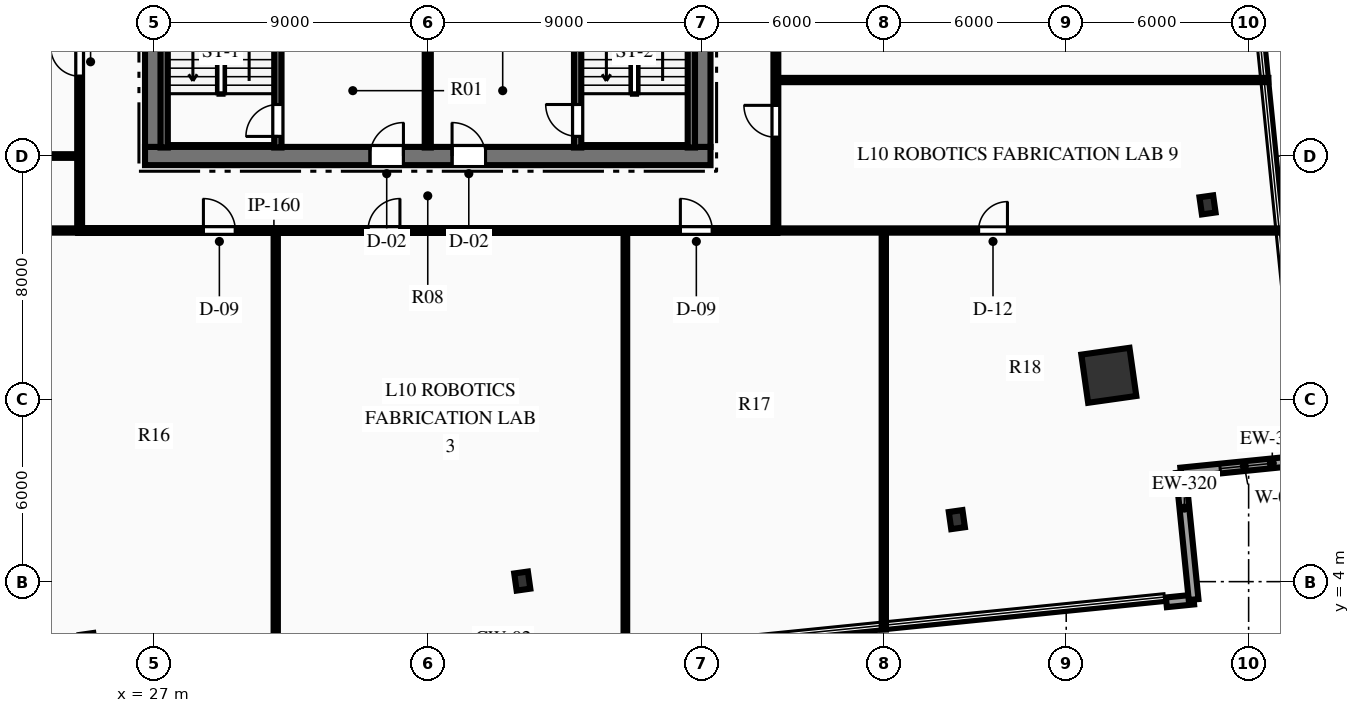
"""IFC4 building model, lengths in metres.
Left out: names, types, materials, properties, quantities, classifications, styles, units other than length and angle.
Written with IfcOpenShell. Run it as: python <this file> out.ifc"""

import sys

from ifc_helpers import new_model, si_unit, direction, frame, frame_2d, origin, origin_2d, place, context, subcontext, project, spatial, rectangle, hollow_rectangle, i_section, extrude, element, fill, save


model = new_model("IFC4")
c1 = context("Model", 3, precision=1e-05, world=origin(), true_north=direction((0.0, 1.0)))
c2 = subcontext(c1, "Body", "Model", "MODEL_VIEW")
j1 = project(units=[si_unit("LENGTHUNIT", "METRE"), si_unit("PLANEANGLEUNIT", "RADIAN")], contexts=[c1])
p1 = place(None, origin())
s1 = spatial("IfcSite", under=j1, at=p1, CompositionType="ELEMENT")
p2 = place(p1, origin())
s2 = spatial("IfcBuilding", under=s1, at=p2, CompositionType="ELEMENT")
p3 = place(p2, frame((0.0, 0.0, 47.7)))
s3 = spatial("IfcBuildingStorey", under=s2, at=p3, CompositionType="ELEMENT", Elevation=47.7)
p4 = place(p3, frame((26.7, 18.0, 0.0), z_axis=(0.0, 0.0, 1.0), x_axis=(1.0, 0.0, 0.0)))
e1 = element("IfcWall", 1, at=p4, inside=s3, PredefinedType="SHEAR", context=c2, shape_type="SweptSolid", body=[
    extrude(rectangle(XDim=18.6, YDim=0.6, at=frame_2d((9.3, 0.0))), origin(), (0.0, 0.0, 1.0), 3.75),
])
p5 = place(p4, frame((7.4, 0.0, 0.0)))
e2 = element("IfcOpeningElement", 2, at=p5, cuts=e1, PredefinedType="OPENING", context=c2, shape_type="SweptSolid", body=[
    extrude(rectangle(XDim=1.1, YDim=2.15, at=frame_2d((0.55, 1.075))), frame((0.0, 0.31, 0.0), z_axis=(0.0, -1.0, 0.0), x_axis=(1.0, 0.0, 0.0)), (0.0, 0.0, 1.0), 0.62),
])
p6 = place(p4, frame((10.1, 0.0, 0.0)))
e3 = element("IfcOpeningElement", 3, at=p6, cuts=e1, PredefinedType="OPENING", context=c2, shape_type="SweptSolid", body=[
    extrude(rectangle(XDim=1.1, YDim=2.15, at=frame_2d((0.55, 1.075))), frame((0.0, 0.31, 0.0), z_axis=(0.0, -1.0, 0.0), x_axis=(1.0, 0.0, 0.0)), (0.0, 0.0, 1.0), 0.62),
])
p7 = place(p3, frame((27.0, 18.3, 0.0), z_axis=(0.0, 0.0, 1.0), x_axis=(0.0, 1.0, 0.0)))
e4 = element("IfcWall", 4, at=p7, inside=s3, PredefinedType="SHEAR", context=c2, shape_type="SweptSolid", body=[
    extrude(rectangle(XDim=15.4, YDim=0.6, at=frame_2d((7.7, 0.0))), origin(), (0.0, 0.0, 1.0), 3.75),
])
p8 = place(p7, frame((9.94, 0.0, 0.0)))
e5 = element("IfcOpeningElement", 5, at=p8, cuts=e4, PredefinedType="OPENING", context=c2, shape_type="SweptSolid", body=[
    extrude(rectangle(XDim=1.4, YDim=2.2, at=frame_2d((0.7, 1.1))), frame((0.0, 0.31, 0.0), z_axis=(0.0, -1.0, 0.0), x_axis=(1.0, 0.0, 0.0)), (0.0, 0.0, 1.0), 0.62),
])
p9 = place(p3, frame((45.0, 18.3, 0.0), z_axis=(0.0, 0.0, 1.0), x_axis=(0.0, 1.0, 0.0)))
e6 = element("IfcWall", 6, at=p9, inside=s3, PredefinedType="SHEAR", context=c2, shape_type="SweptSolid", body=[
    extrude(rectangle(XDim=15.4, YDim=0.6, at=frame_2d((7.7, 0.0))), origin(), (0.0, 0.0, 1.0), 3.75),
])
p10 = place(p9, frame((9.94, 0.0, 0.0)))
e7 = element("IfcOpeningElement", 7, at=p10, cuts=e6, PredefinedType="OPENING", context=c2, shape_type="SweptSolid", body=[
    extrude(rectangle(XDim=1.4, YDim=2.2, at=frame_2d((0.7, 1.1))), frame((0.0, 0.31, 0.0), z_axis=(0.0, -1.0, 0.0), x_axis=(1.0, 0.0, 0.0)), (0.0, 0.0, 1.0), 0.62),
])
p11 = place(p3, frame((31.07, 18.28, 0.0), z_axis=(0.0, 0.0, 1.0), x_axis=(0.0, 1.0, 0.0)))
e8 = element("IfcWall", 8, at=p11, inside=s3, PredefinedType="SHEAR", context=c2, shape_type="SweptSolid", body=[
    extrude(rectangle(XDim=8.26, YDim=0.24, at=frame_2d((4.13, 0.0))), origin(), (0.0, 0.0, 1.0), 3.75),
])
p12 = place(p11, frame((0.365, 0.0, 0.0)))
e9 = element("IfcOpeningElement", 9, at=p12, cuts=e8, PredefinedType="OPENING", context=c2, shape_type="SweptSolid", body=[
    extrude(rectangle(XDim=1.05, YDim=2.15, at=frame_2d((0.525, 1.075))), frame((0.0, 0.13, 0.0), z_axis=(0.0, -1.0, 0.0), x_axis=(1.0, 0.0, 0.0)), (0.0, 0.0, 1.0), 0.26),
])
p13 = place(p3, frame((27.33, 18.28, 0.0), z_axis=(0.0, 0.0, 1.0), x_axis=(0.0, 1.0, 0.0)))
e10 = element("IfcWall", 10, at=p13, inside=s3, PredefinedType="SHEAR", context=c2, shape_type="SweptSolid", body=[
    extrude(rectangle(XDim=8.26, YDim=0.24, at=frame_2d((4.13, 0.0))), origin(), (0.0, 0.0, 1.0), 3.75),
])
p14 = place(p3, frame((40.93, 18.28, 0.0), z_axis=(0.0, 0.0, 1.0), x_axis=(0.0, 1.0, 0.0)))
e11 = element("IfcWall", 11, at=p14, inside=s3, PredefinedType="SHEAR", context=c2, shape_type="SweptSolid", body=[
    extrude(rectangle(XDim=8.26, YDim=0.24, at=frame_2d((4.13, 0.0))), origin(), (0.0, 0.0, 1.0), 3.75),
])
p15 = place(p14, frame((0.365, 0.0, 0.0)))
e12 = element("IfcOpeningElement", 12, at=p15, cuts=e11, PredefinedType="OPENING", context=c2, shape_type="SweptSolid", body=[
    extrude(rectangle(XDim=1.05, YDim=2.15, at=frame_2d((0.525, 1.075))), frame((0.0, 0.13, 0.0), z_axis=(0.0, -1.0, 0.0), x_axis=(1.0, 0.0, 0.0)), (0.0, 0.0, 1.0), 0.26),
])
p16 = place(p3, frame((44.67, 18.28, 0.0), z_axis=(0.0, 0.0, 1.0), x_axis=(0.0, 1.0, 0.0)))
e13 = element("IfcWall", 13, at=p16, inside=s3, PredefinedType="SHEAR", context=c2, shape_type="SweptSolid", body=[
    extrude(rectangle(XDim=8.26, YDim=0.24, at=frame_2d((4.13, 0.0))), origin(), (0.0, 0.0, 1.0), 3.75),
])
p17 = place(p3, frame((58.401, 10.787, 0.0), z_axis=(0.0, 0.0, 1.0), x_axis=(0.990146240249, 0.140037219771, 0.0)))
e14 = element("IfcColumn", 14, at=p17, inside=s3, PredefinedType="COLUMN", context=c2, shape_type="SweptSolid", body=[
    extrude(hollow_rectangle(XDim=1.6, YDim=1.6, WallThickness=0.08, at=origin_2d()), origin(), (0.0, 0.0, 1.0), 3.75),
])
for number, where, z_axis, x_axis in (
    (15, (24.815, 1.997, 0.0), (0.0, 0.0, 1.0), (0.99, 0.14, 0.0)),
    (16, (39.109, 4.019, 0.0), (0.0, 0.0, 1.0), (0.99, 0.14, 0.0)),
    (17, (53.403, 6.04, 0.0), (0.0, 0.0, 1.0), (0.99, 0.14, 0.0)),
    (18, (61.648, 16.393, 0.0), (0.0, 0.0, 1.0), (0.99, 0.14, 0.0)),
):
    element("IfcColumn", number, at=place(p3, frame(where, z_axis=z_axis, x_axis=x_axis)), inside=s3, PredefinedType="COLUMN", context=c2, shape_type="SweptSolid", body=[
        extrude(i_section(OverallWidth=0.454, OverallDepth=0.569, WebThickness=0.078, FlangeThickness=0.125, at=origin_2d()), origin(), (0.0, 0.0, 1.0), 3.75),
    ])
p18 = place(p3, frame((61.19, 3.41, 0.0), z_axis=(0.0, 0.0, 1.0), x_axis=(-0.994950877973, -0.100363092925, 0.0)))
e19 = element("IfcWall", 19, at=p18, inside=s3, PredefinedType="STANDARD", context=c2, shape_type="SweptSolid", body=[
    extrude(rectangle(XDim=0.9, YDim=0.32, at=frame_2d((0.45, 0.0))), origin(), (0.0, 0.0, 1.0), 3.44),
])
p19 = place(p3, frame((60.769, 7.589, 0.0), z_axis=(0.0, 0.0, 1.0), x_axis=(0.100159830235, -0.994971360596, 0.0)))
e20 = element("IfcWall", 20, at=p19, inside=s3, PredefinedType="STANDARD", context=c2, shape_type="SweptSolid", body=[
    extrude(rectangle(XDim=4.2, YDim=0.32, at=frame_2d((2.1, 0.0))), origin(), (0.0, 0.0, 1.0), 3.44),
])
p20 = place(p3, frame((64.948, 8.01, 0.0), z_axis=(0.0, 0.0, 1.0), x_axis=(-0.994965565847, -0.10021737763, 0.0)))
e21 = element("IfcWall", 21, at=p20, inside=s3, PredefinedType="STANDARD", context=c2, shape_type="SweptSolid", body=[
    extrude(rectangle(XDim=4.2, YDim=0.32, at=frame_2d((2.1, 0.0))), origin(), (0.0, 0.0, 1.0), 3.44),
])
p21 = place(p20, frame((1.3, 0.0, 0.85)))
e22 = element("IfcOpeningElement", 22, at=p21, cuts=e21, PredefinedType="OPENING", context=c2, shape_type="SweptSolid", body=[
    extrude(rectangle(XDim=1.6, YDim=2.1, at=frame_2d((0.8, 1.05))), frame((0.0, 0.17, 0.0), z_axis=(0.0, -1.0, 0.0), x_axis=(1.0, 0.0, 0.0)), (0.0, 0.0, 1.0), 0.34),
])
p22 = place(p3, frame((36.0, 18.28, 0.0), z_axis=(0.0, 0.0, 1.0), x_axis=(0.0, 1.0, 0.0)))
e23 = element("IfcWall", 23, at=p22, inside=s3, PredefinedType="PARTITIONING", context=c2, shape_type="SweptSolid", body=[
    extrude(rectangle(XDim=3.77, YDim=0.2, at=frame_2d((1.885, 0.0))), origin(), (0.0, 0.0, 1.0), 3.44),
])
p23 = place(p3, frame((24.5, 15.55, 0.0), z_axis=(0.0, 0.0, 1.0), x_axis=(1.0, 0.0, 0.0)))
e24 = element("IfcWall", 24, at=p23, inside=s3, PredefinedType="PARTITIONING", context=c2, shape_type="SweptSolid", body=[
    extrude(rectangle(XDim=23.0, YDim=0.16, at=frame_2d((11.5, 0.0))), origin(), (0.0, 0.0, 1.0), 3.44),
])
p24 = place(p23, frame((4.121, 0.0, 0.0)))
e25 = element("IfcOpeningElement", 25, at=p24, cuts=e24, PredefinedType="OPENING", context=c2, shape_type="SweptSolid", body=[
    extrude(rectangle(XDim=1.05, YDim=2.15, at=frame_2d((0.525, 1.075))), frame((0.0, 0.09, 0.0), z_axis=(0.0, -1.0, 0.0), x_axis=(1.0, 0.0, 0.0)), (0.0, 0.0, 1.0), 0.18),
])
p25 = place(p23, frame((9.535, 0.0, 0.0)))
e26 = element("IfcOpeningElement", 26, at=p25, cuts=e24, PredefinedType="OPENING", context=c2, shape_type="SweptSolid", body=[
    extrude(rectangle(XDim=1.05, YDim=2.15, at=frame_2d((0.525, 1.075))), frame((0.0, 0.09, 0.0), z_axis=(0.0, -1.0, 0.0), x_axis=(1.0, 0.0, 0.0)), (0.0, 0.0, 1.0), 0.18),
])
p26 = place(p23, frame((19.809, 0.0, 0.0)))
e27 = element("IfcOpeningElement", 27, at=p26, cuts=e24, PredefinedType="OPENING", context=c2, shape_type="SweptSolid", body=[
    extrude(rectangle(XDim=1.05, YDim=2.15, at=frame_2d((0.525, 1.075))), frame((0.0, 0.09, 0.0), z_axis=(0.0, -1.0, 0.0), x_axis=(1.0, 0.0, 0.0)), (0.0, 0.0, 1.0), 0.18),
])
p27 = place(p3, frame((24.55, 15.55, 0.0), z_axis=(0.0, 0.0, 1.0), x_axis=(0.0, 1.0, 0.0)))
e28 = element("IfcWall", 28, at=p27, inside=s3, PredefinedType="PARTITIONING", context=c2, shape_type="SweptSolid", body=[
    extrude(rectangle(XDim=20.9, YDim=0.16, at=frame_2d((10.45, 0.0))), origin(), (0.0, 0.0, 1.0), 3.44),
])
p28 = place(p27, frame((5.075, 0.0, 0.0)))
e29 = element("IfcOpeningElement", 29, at=p28, cuts=e28, PredefinedType="OPENING", context=c2, shape_type="SweptSolid", body=[
    extrude(rectangle(XDim=0.95, YDim=2.15, at=frame_2d((0.475, 1.075))), frame((0.0, 0.09, 0.0), z_axis=(0.0, -1.0, 0.0), x_axis=(1.0, 0.0, 0.0)), (0.0, 0.0, 1.0), 0.18),
])
p29 = place(p27, frame((15.563, 0.0, 0.0)))
e30 = element("IfcOpeningElement", 30, at=p29, cuts=e28, PredefinedType="OPENING", context=c2, shape_type="SweptSolid", body=[
    extrude(rectangle(XDim=1.05, YDim=2.15, at=frame_2d((0.525, 1.075))), frame((0.0, 0.09, 0.0), z_axis=(0.0, -1.0, 0.0), x_axis=(1.0, 0.0, 0.0)), (0.0, 0.0, 1.0), 0.18),
])
p30 = place(p3, frame((47.45, 15.55, 0.0), z_axis=(0.0, 0.0, 1.0), x_axis=(0.0, 1.0, 0.0)))
e31 = element("IfcWall", 31, at=p30, inside=s3, PredefinedType="PARTITIONING", context=c2, shape_type="SweptSolid", body=[
    extrude(rectangle(XDim=20.9, YDim=0.16, at=frame_2d((10.45, 0.0))), origin(), (0.0, 0.0, 1.0), 3.44),
])
p31 = place(p30, frame((3.067, 0.0, 0.0)))
e32 = element("IfcOpeningElement", 32, at=p31, cuts=e31, PredefinedType="OPENING", context=c2, shape_type="SweptSolid", body=[
    extrude(rectangle(XDim=1.05, YDim=2.15, at=frame_2d((0.525, 1.075))), frame((0.0, 0.09, 0.0), z_axis=(0.0, -1.0, 0.0), x_axis=(1.0, 0.0, 0.0)), (0.0, 0.0, 1.0), 0.18),
])
p32 = place(p30, frame((6.065, 0.0, 0.0)))
e33 = element("IfcOpeningElement", 33, at=p32, cuts=e31, PredefinedType="OPENING", context=c2, shape_type="SweptSolid", body=[
    extrude(rectangle(XDim=1.05, YDim=2.15, at=frame_2d((0.525, 1.075))), frame((0.0, 0.09, 0.0), z_axis=(0.0, -1.0, 0.0), x_axis=(1.0, 0.0, 0.0)), (0.0, 0.0, 1.0), 0.18),
])
p33 = place(p30, frame((11.661, 0.0, 0.0)))
e34 = element("IfcOpeningElement", 34, at=p33, cuts=e31, PredefinedType="OPENING", context=c2, shape_type="SweptSolid", body=[
    extrude(rectangle(XDim=1.05, YDim=2.15, at=frame_2d((0.525, 1.075))), frame((0.0, 0.09, 0.0), z_axis=(0.0, -1.0, 0.0), x_axis=(1.0, 0.0, 0.0)), (0.0, 0.0, 1.0), 0.18),
])
p34 = place(p30, frame((18.781, 0.0, 0.0)))
e35 = element("IfcOpeningElement", 35, at=p34, cuts=e31, PredefinedType="OPENING", context=c2, shape_type="SweptSolid", body=[
    extrude(rectangle(XDim=1.05, YDim=2.15, at=frame_2d((0.525, 1.075))), frame((0.0, 0.09, 0.0), z_axis=(0.0, -1.0, 0.0), x_axis=(1.0, 0.0, 0.0)), (0.0, 0.0, 1.0), 0.18),
])
p35 = place(p3, frame((9.956, 15.55, 0.0), z_axis=(0.0, 0.0, 1.0), x_axis=(1.0, 0.0, 0.0)))
e36 = element("IfcWall", 36, at=p35, inside=s3, PredefinedType="PARTITIONING", context=c2, shape_type="SweptSolid", body=[
    extrude(rectangle(XDim=14.594, YDim=0.14, at=frame_2d((7.297, 0.0))), origin(), (0.0, 0.0, 1.0), 3.44),
])
p36 = place(p35, frame((9.016, 0.0, 0.0)))
e37 = element("IfcOpeningElement", 37, at=p36, cuts=e36, PredefinedType="OPENING", context=c2, shape_type="SweptSolid", body=[
    extrude(rectangle(XDim=0.95, YDim=2.15, at=frame_2d((0.475, 1.075))), frame((0.0, 0.08, 0.0), z_axis=(0.0, -1.0, 0.0), x_axis=(1.0, 0.0, 0.0)), (0.0, 0.0, 1.0), 0.16),
])
p37 = place(p3, frame((47.45, 15.55, 0.0), z_axis=(0.0, 0.0, 1.0), x_axis=(1.0, 0.0, 0.0)))
e38 = element("IfcWall", 38, at=p37, inside=s3, PredefinedType="PARTITIONING", context=c2, shape_type="SweptSolid", body=[
    extrude(rectangle(XDim=16.699, YDim=0.14, at=frame_2d((8.349, 0.0))), origin(), (0.0, 0.0, 1.0), 3.44),
])
p38 = place(p37, frame((6.667, 0.0, 0.0)))
e39 = element("IfcOpeningElement", 39, at=p38, cuts=e38, PredefinedType="OPENING", context=c2, shape_type="SweptSolid", body=[
    extrude(rectangle(XDim=0.95, YDim=2.15, at=frame_2d((0.475, 1.075))), frame((0.0, 0.08, 0.0), z_axis=(0.0, -1.0, 0.0), x_axis=(1.0, 0.0, 0.0)), (0.0, 0.0, 1.0), 0.16),
])
p39 = place(p3, frame((31.0, 0.41, 0.0), z_axis=(0.0, 0.0, 1.0), x_axis=(0.0, 1.0, 0.0)))
e40 = element("IfcWall", 40, at=p39, inside=s3, PredefinedType="PARTITIONING", context=c2, shape_type="SweptSolid", body=[
    extrude(rectangle(XDim=15.14, YDim=0.14, at=frame_2d((7.57, 0.0))), origin(), (0.0, 0.0, 1.0), 3.44),
])
p40 = place(p3, frame((42.5, 1.568, 0.0), z_axis=(0.0, 0.0, 1.0), x_axis=(0.0, 1.0, 0.0)))
e41 = element("IfcWall", 41, at=p40, inside=s3, PredefinedType="PARTITIONING", context=c2, shape_type="SweptSolid", body=[
    extrude(rectangle(XDim=13.982, YDim=0.12, at=frame_2d((6.991, 0.0))), origin(), (0.0, 0.0, 1.0), 3.44),
])
p41 = place(p3, frame((51.0, 2.424, 0.0), z_axis=(0.0, 0.0, 1.0), x_axis=(0.0, 1.0, 0.0)))
e42 = element("IfcWall", 42, at=p41, inside=s3, PredefinedType="PARTITIONING", context=c2, shape_type="SweptSolid", body=[
    extrude(rectangle(XDim=13.126, YDim=0.14, at=frame_2d((6.563, 0.0))), origin(), (0.0, 0.0, 1.0), 3.44),
])
p42 = place(p3, frame((47.45, 20.5, 0.0), z_axis=(0.0, 0.0, 1.0), x_axis=(1.0, 0.0, 0.0)))
e43 = element("IfcWall", 43, at=p42, inside=s3, PredefinedType="PARTITIONING", context=c2, shape_type="SweptSolid", body=[
    extrude(rectangle(XDim=16.2, YDim=0.14, at=frame_2d((8.1, 0.0))), origin(), (0.0, 0.0, 1.0), 3.44),
])
p43 = place(p3, frame((20.2, 18.0, 0.0), z_axis=(0.0, 0.0, 1.0), x_axis=(1.0, 0.0, 0.0)))
e44 = element("IfcWall", 44, at=p43, inside=s3, PredefinedType="PARTITIONING", context=c2, shape_type="SweptSolid", body=[
    extrude(rectangle(XDim=4.35, YDim=0.12, at=frame_2d((2.175, 0.0))), origin(), (0.0, 0.0, 1.0), 3.44),
])
p44 = place(p21, origin())
e45 = element("IfcWindow", 45, at=p44, inside=s3, PartitioningType="SINGLE_PANEL", PredefinedType="WINDOW", context=c2, shape_type="SweptSolid", body=[
    extrude(rectangle(XDim=1.6, YDim=2.1, at=frame_2d((0.8, 1.05))), frame((0.0, 0.03, 0.0), z_axis=(0.0, -1.0, 0.0), x_axis=(1.0, 0.0, 0.0)), (0.0, 0.0, 1.0), 0.06),
])
fill(e22, e45)
p45 = place(p12, origin())
e46 = element("IfcDoor", 46, at=p45, inside=s3, OperationType="SINGLE_SWING_LEFT", PredefinedType="DOOR", context=c2, shape_type="SweptSolid", body=[
    extrude(rectangle(XDim=1.05, YDim=2.15, at=frame_2d((0.525, 1.075))), frame((0.0, 0.025, 0.0), z_axis=(0.0, -1.0, 0.0), x_axis=(1.0, 0.0, 0.0)), (0.0, 0.0, 1.0), 0.05),
])
fill(e9, e46)
p46 = place(p15, origin())
e47 = element("IfcDoor", 47, at=p46, inside=s3, OperationType="SINGLE_SWING_RIGHT", PredefinedType="DOOR", context=c2, shape_type="SweptSolid", body=[
    extrude(rectangle(XDim=1.05, YDim=2.15, at=frame_2d((0.525, 1.075))), frame((0.0, 0.025, 0.0), z_axis=(0.0, -1.0, 0.0), x_axis=(1.0, 0.0, 0.0)), (0.0, 0.0, 1.0), 0.05),
])
fill(e12, e47)
p47 = place(p5, origin())
e48 = element("IfcDoor", 48, at=p47, inside=s3, OperationType="SINGLE_SWING_RIGHT", PredefinedType="DOOR", context=c2, shape_type="SweptSolid", body=[
    extrude(rectangle(XDim=1.1, YDim=2.15, at=frame_2d((0.55, 1.075))), frame((0.0, 0.025, 0.0), z_axis=(0.0, -1.0, 0.0), x_axis=(1.0, 0.0, 0.0)), (0.0, 0.0, 1.0), 0.05),
])
fill(e2, e48)
p48 = place(p6, origin())
e49 = element("IfcDoor", 49, at=p48, inside=s3, OperationType="SINGLE_SWING_LEFT", PredefinedType="DOOR", context=c2, shape_type="SweptSolid", body=[
    extrude(rectangle(XDim=1.1, YDim=2.15, at=frame_2d((0.55, 1.075))), frame((0.0, 0.025, 0.0), z_axis=(0.0, -1.0, 0.0), x_axis=(1.0, 0.0, 0.0)), (0.0, 0.0, 1.0), 0.05),
])
fill(e3, e49)
p49 = place(p28, origin())
e50 = element("IfcDoor", 50, at=p49, inside=s3, OperationType="SINGLE_SWING_RIGHT", PredefinedType="DOOR", context=c2, shape_type="SweptSolid", body=[
    extrude(rectangle(XDim=0.95, YDim=2.15, at=frame_2d((0.475, 1.075))), frame((0.0, 0.025, 0.0), z_axis=(0.0, -1.0, 0.0), x_axis=(1.0, 0.0, 0.0)), (0.0, 0.0, 1.0), 0.05),
])
fill(e29, e50)
p50 = place(p24, origin())
e51 = element("IfcDoor", 51, at=p50, inside=s3, OperationType="SINGLE_SWING_LEFT", PredefinedType="DOOR", context=c2, shape_type="SweptSolid", body=[
    extrude(rectangle(XDim=1.05, YDim=2.15, at=frame_2d((0.525, 1.075))), frame((0.0, 0.025, 0.0), z_axis=(0.0, -1.0, 0.0), x_axis=(1.0, 0.0, 0.0)), (0.0, 0.0, 1.0), 0.05),
])
fill(e25, e51)
p51 = place(p25, origin())
e52 = element("IfcDoor", 52, at=p51, inside=s3, OperationType="SINGLE_SWING_RIGHT", PredefinedType="DOOR", context=c2, shape_type="SweptSolid", body=[
    extrude(rectangle(XDim=1.05, YDim=2.15, at=frame_2d((0.525, 1.075))), frame((0.0, 0.025, 0.0), z_axis=(0.0, -1.0, 0.0), x_axis=(1.0, 0.0, 0.0)), (0.0, 0.0, 1.0), 0.05),
])
fill(e26, e52)
p52 = place(p26, origin())
e53 = element("IfcDoor", 53, at=p52, inside=s3, OperationType="SINGLE_SWING_LEFT", PredefinedType="DOOR", context=c2, shape_type="SweptSolid", body=[
    extrude(rectangle(XDim=1.05, YDim=2.15, at=frame_2d((0.525, 1.075))), frame((0.0, 0.025, 0.0), z_axis=(0.0, -1.0, 0.0), x_axis=(1.0, 0.0, 0.0)), (0.0, 0.0, 1.0), 0.05),
])
fill(e27, e53)
p53 = place(p38, origin())
e54 = element("IfcDoor", 54, at=p53, inside=s3, OperationType="SINGLE_SWING_RIGHT", PredefinedType="DOOR", context=c2, shape_type="SweptSolid", body=[
    extrude(rectangle(XDim=0.95, YDim=2.15, at=frame_2d((0.475, 1.075))), frame((0.0, 0.025, 0.0), z_axis=(0.0, -1.0, 0.0), x_axis=(1.0, 0.0, 0.0)), (0.0, 0.0, 1.0), 0.05),
])
fill(e39, e54)
p54 = place(p31, origin())
e55 = element("IfcDoor", 55, at=p54, inside=s3, OperationType="SINGLE_SWING_RIGHT", PredefinedType="DOOR", context=c2, shape_type="SweptSolid", body=[
    extrude(rectangle(XDim=1.05, YDim=2.15, at=frame_2d((0.525, 1.075))), frame((0.0, 0.025, 0.0), z_axis=(0.0, -1.0, 0.0), x_axis=(1.0, 0.0, 0.0)), (0.0, 0.0, 1.0), 0.05),
])
fill(e32, e55)
save(model, sys.argv[1])
